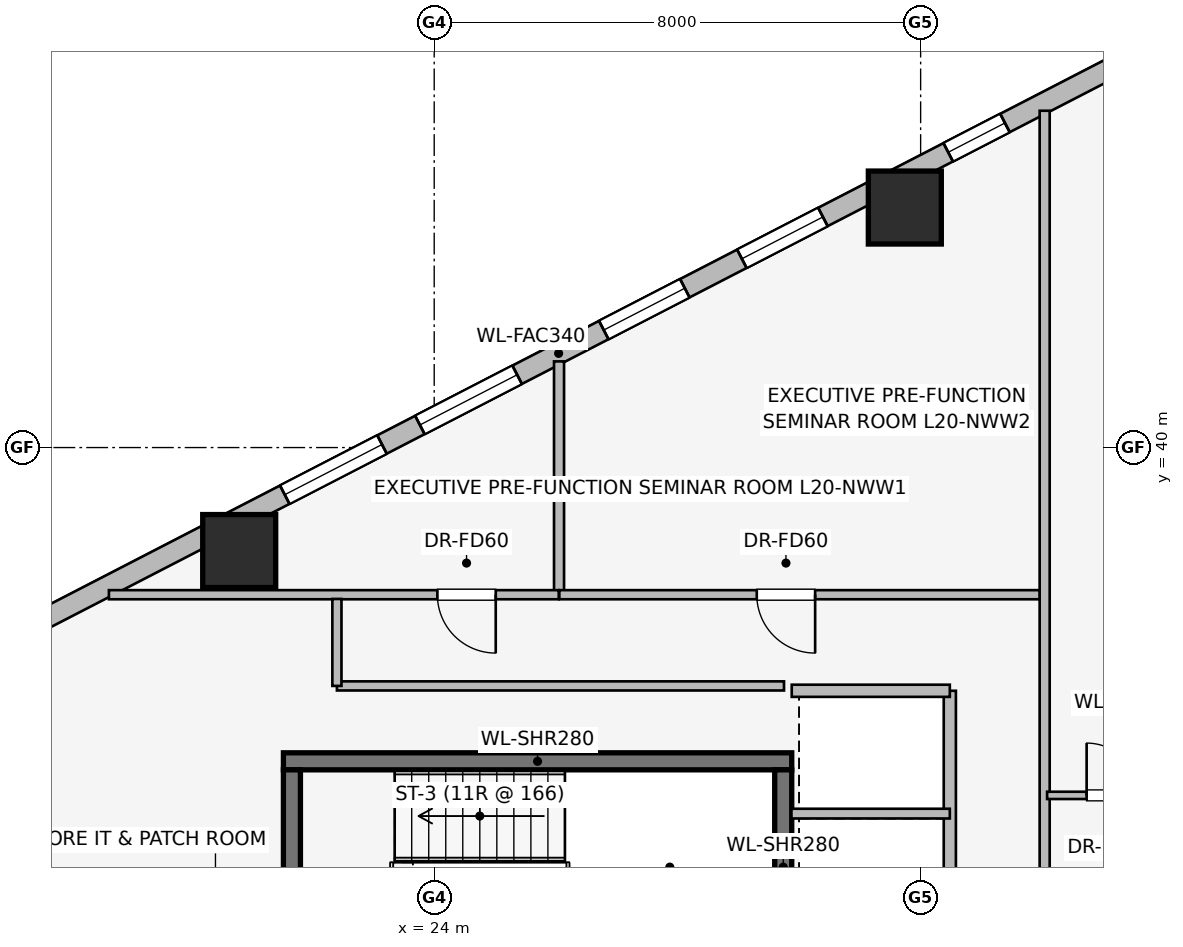
"""IFC4 building model, lengths in metres.
Left out: names, types, materials, properties, quantities, classifications, styles, units other than length and angle.
Written with IfcOpenShell. Run it as: python <this file> out.ifc"""

import sys

from ifc_helpers import new_model, si_unit, direction, frame, frame_2d, origin, origin_2d, place, context, subcontext, project, spatial, rectangle, extrude, element, fill, save


model = new_model("IFC4")
c1 = context("Model", 3, precision=1e-05, world=origin(), true_north=direction((0.0, 1.0)))
c2 = subcontext(c1, "Body", "Model", "MODEL_VIEW")
j1 = project(units=[si_unit("LENGTHUNIT", "METRE"), si_unit("PLANEANGLEUNIT", "RADIAN")], contexts=[c1])
p1 = place(None, origin())
s1 = spatial("IfcSite", under=j1, at=p1, CompositionType="ELEMENT")
p2 = place(p1, origin())
s2 = spatial("IfcBuilding", under=s1, at=p2, CompositionType="ELEMENT")
p3 = place(p2, frame((0.0, 0.0, 78.1)))
s3 = spatial("IfcBuildingStorey", under=s2, at=p3, CompositionType="ELEMENT", Elevation=78.1)
p4 = place(p3, frame((29.88, 34.84, 0.0), z_axis=(0.0, 0.0, 1.0), x_axis=(-1.0, 0.0, 0.0)))
e1 = element("IfcWall", 1, at=p4, inside=s3, PredefinedType="SHEAR", context=c2, shape_type="SweptSolid", body=[
    extrude(rectangle(XDim=8.36, YDim=0.28, at=frame_2d((4.18, 0.0))), origin(), (0.0, 0.0, 1.0), 3.65),
])
for number, where, z_axis, x_axis in (
    (2, (21.66, 34.7, 0.0), (0.0, 0.0, 1.0), (0.0, -1.0, 0.0)),
    (3, (29.74, 31.5, 0.0), (0.0, 0.0, 1.0), (0.0, 1.0, 0.0)),
):
    element("IfcWall", number, at=place(p3, frame(where, z_axis=z_axis, x_axis=x_axis)), inside=s3, PredefinedType="SHEAR", context=c2, shape_type="SweptSolid", body=[
        extrude(rectangle(XDim=3.2, YDim=0.28, at=frame_2d((1.6, 0.0))), origin(), (0.0, 0.0, 1.0), 3.65),
    ])
for number, where, z_axis, x_axis in (
    (4, (31.74, 43.947, 0.0), (0.0, 0.0, 1.0), (1.0, 0.0, 0.0)),
    (5, (20.793, 38.298, 0.0), (0.0, 0.0, 1.0), (1.0, 0.0, 0.0)),
):
    element("IfcColumn", number, at=place(p3, frame(where, z_axis=z_axis, x_axis=x_axis)), inside=s3, PredefinedType="COLUMN", context=c2, shape_type="SweptSolid", body=[
        extrude(rectangle(XDim=1.2, YDim=1.2, at=origin_2d()), origin(), (0.0, 0.0, 1.0), 3.65),
    ])
p5 = place(p3, frame((16.924, 36.841, 0.0), z_axis=(0.0, 0.0, 1.0), x_axis=(0.888634413993, 0.458616264721, 0.0)))
e6 = element("IfcWall", 6, at=p5, inside=s3, PredefinedType="STANDARD", context=c2, shape_type="SweptSolid", body=[
    extrude(rectangle(XDim=20.531, YDim=0.34, at=frame_2d((10.266, 0.0))), origin(), (0.0, 0.0, 1.0), 2.684),
])
p6 = place(p5, frame((5.197, 0.0, 0.75)))
e7 = element("IfcOpeningElement", 7, at=p6, cuts=e6, PredefinedType="OPENING", context=c2, shape_type="SweptSolid", body=[
    extrude(rectangle(XDim=1.8, YDim=1.5, at=frame_2d((0.9, 0.75))), frame((0.0, 0.18, 0.0), z_axis=(0.0, -1.0, 0.0), x_axis=(1.0, 0.0, 0.0)), (0.0, 0.0, 1.0), 0.36),
])
p7 = place(p5, frame((7.698, 0.0, 0.75)))
e8 = element("IfcOpeningElement", 8, at=p7, cuts=e6, PredefinedType="OPENING", context=c2, shape_type="SweptSolid", body=[
    extrude(rectangle(XDim=1.8, YDim=1.5, at=frame_2d((0.9, 0.75))), frame((0.0, 0.18, 0.0), z_axis=(0.0, -1.0, 0.0), x_axis=(1.0, 0.0, 0.0)), (0.0, 0.0, 1.0), 0.36),
])
p8 = place(p5, frame((11.101, 0.0, 0.75)))
e9 = element("IfcOpeningElement", 9, at=p8, cuts=e6, PredefinedType="OPENING", context=c2, shape_type="SweptSolid", body=[
    extrude(rectangle(XDim=1.5, YDim=1.5, at=frame_2d((0.75, 0.75))), frame((0.0, 0.18, 0.0), z_axis=(0.0, -1.0, 0.0), x_axis=(1.0, 0.0, 0.0)), (0.0, 0.0, 1.0), 0.36),
])
p9 = place(p5, frame((13.657, 0.0, 0.75)))
e10 = element("IfcOpeningElement", 10, at=p9, cuts=e6, PredefinedType="OPENING", context=c2, shape_type="SweptSolid", body=[
    extrude(rectangle(XDim=1.5, YDim=1.5, at=frame_2d((0.75, 0.75))), frame((0.0, 0.18, 0.0), z_axis=(0.0, -1.0, 0.0), x_axis=(1.0, 0.0, 0.0)), (0.0, 0.0, 1.0), 0.36),
])
p10 = place(p5, frame((17.476, 0.0, 0.75)))
e11 = element("IfcOpeningElement", 11, at=p10, cuts=e6, PredefinedType="OPENING", context=c2, shape_type="SweptSolid", body=[
    extrude(rectangle(XDim=1.05, YDim=1.4, at=frame_2d((0.525, 0.7))), frame((0.0, 0.18, 0.0), z_axis=(0.0, -1.0, 0.0), x_axis=(1.0, 0.0, 0.0)), (0.0, 0.0, 1.0), 0.36),
])
p11 = place(p3, frame((32.48, 31.95, 0.0), z_axis=(0.0, 0.0, 1.0), x_axis=(0.0, 1.0, 0.0)))
e12 = element("IfcWall", 12, at=p11, inside=s3, PredefinedType="PARTITIONING", context=c2, shape_type="SweptSolid", body=[
    extrude(rectangle(XDim=4.05, YDim=0.2, at=frame_2d((2.025, 0.0))), origin(), (0.0, 0.0, 1.0), 2.513),
])
p12 = place(p3, frame((29.88, 36.0, 0.0), z_axis=(0.0, 0.0, 1.0), x_axis=(1.0, 0.0, 0.0)))
e13 = element("IfcWall", 13, at=p12, inside=s3, PredefinedType="PARTITIONING", context=c2, shape_type="SweptSolid", body=[
    extrude(rectangle(XDim=2.6, YDim=0.2, at=frame_2d((1.3, 0.0))), origin(), (0.0, 0.0, 1.0), 3.39),
])
p13 = place(p3, frame((29.875, 33.98, 0.0), z_axis=(0.0, 0.0, 1.0), x_axis=(1.0, 0.0, 0.0)))
e14 = element("IfcWall", 14, at=p13, inside=s3, PredefinedType="PARTITIONING", context=c2, shape_type="SweptSolid", body=[
    extrude(rectangle(XDim=2.605, YDim=0.16, at=frame_2d((1.302, 0.0))), origin(), (0.0, 0.0, 1.0), 3.39),
])
p14 = place(p3, frame((26.053, 37.61, 0.0), z_axis=(0.0, 0.0, 1.0), x_axis=(0.0, 1.0, 0.0)))
e15 = element("IfcWall", 15, at=p14, inside=s3, PredefinedType="PARTITIONING", context=c2, shape_type="SweptSolid", body=[
    extrude(rectangle(XDim=3.807, YDim=0.165, at=frame_2d((1.903, 0.0))), origin(), (0.0, 0.0, 1.0), 3.39),
])
p15 = place(p3, frame((26.048, 37.58, 0.0), z_axis=(0.0, 0.0, 1.0), x_axis=(-1.0, 0.0, 0.0)))
e16 = element("IfcWall", 16, at=p15, inside=s3, PredefinedType="PARTITIONING", context=c2, shape_type="SweptSolid", body=[
    extrude(rectangle(XDim=7.398, YDim=0.15, at=frame_2d((3.699, 0.0))), origin(), (0.0, 0.0, 1.0), 3.39),
])
p16 = place(p15, frame((1.036, 0.0, 0.0)))
e17 = element("IfcOpeningElement", 17, at=p16, cuts=e16, PredefinedType="OPENING", context=c2, shape_type="SweptSolid", body=[
    extrude(rectangle(XDim=0.96, YDim=2.0, at=frame_2d((0.48, 1.0))), frame((0.0, 0.085, 0.0), z_axis=(0.0, -1.0, 0.0), x_axis=(1.0, 0.0, 0.0)), (0.0, 0.0, 1.0), 0.17),
])
p17 = place(p3, frame((33.962, 37.58, 0.0), z_axis=(0.0, 0.0, 1.0), x_axis=(-1.0, 0.0, 0.0)))
e18 = element("IfcWall", 18, at=p17, inside=s3, PredefinedType="PARTITIONING", context=c2, shape_type="SweptSolid", body=[
    extrude(rectangle(XDim=7.904, YDim=0.15, at=frame_2d((3.952, 0.0))), origin(), (0.0, 0.0, 1.0), 3.39),
])
p18 = place(p17, frame((3.697, 0.0, 0.0)))
e19 = element("IfcOpeningElement", 19, at=p18, cuts=e18, PredefinedType="OPENING", context=c2, shape_type="SweptSolid", body=[
    extrude(rectangle(XDim=0.96, YDim=2.0, at=frame_2d((0.48, 1.0))), frame((0.0, 0.085, 0.0), z_axis=(0.0, -1.0, 0.0), x_axis=(1.0, 0.0, 0.0)), (0.0, 0.0, 1.0), 0.17),
])
p19 = place(p3, frame((34.04, 31.96, 0.0), z_axis=(0.0, 0.0, 1.0), x_axis=(0.0, 1.0, 0.0)))
e20 = element("IfcWall", 20, at=p19, inside=s3, PredefinedType="PARTITIONING", context=c2, shape_type="SweptSolid", body=[
    extrude(rectangle(XDim=13.579, YDim=0.165, at=frame_2d((6.79, 0.0))), origin(), (0.0, 0.0, 1.0), 3.39),
])
p20 = place(p3, frame((34.08, 34.28, 0.0), z_axis=(0.0, 0.0, 1.0), x_axis=(1.0, 0.0, 0.0)))
e21 = element("IfcWall", 21, at=p20, inside=s3, PredefinedType="PARTITIONING", context=c2, shape_type="SweptSolid", body=[
    extrude(rectangle(XDim=2.48, YDim=0.12, at=frame_2d((1.24, 0.0))), origin(), (0.0, 0.0, 1.0), 3.39),
])
p21 = place(p20, frame((0.65, 0.0, 0.0)))
e22 = element("IfcOpeningElement", 22, at=p21, cuts=e21, PredefinedType="OPENING", context=c2, shape_type="SweptSolid", body=[
    extrude(rectangle(XDim=0.86, YDim=2.0, at=frame_2d((0.43, 1.0))), frame((0.0, 0.07, 0.0), z_axis=(0.0, -1.0, 0.0), x_axis=(1.0, 0.0, 0.0)), (0.0, 0.0, 1.0), 0.14),
])
p22 = place(p3, frame((29.753, 36.08, 0.0), z_axis=(0.0, 0.0, 1.0), x_axis=(-1.0, 0.0, 0.0)))
e23 = element("IfcWall", 23, at=p22, inside=s3, PredefinedType="PARTITIONING", context=c2, shape_type="SweptSolid", body=[
    extrude(rectangle(XDim=7.353, YDim=0.15, at=frame_2d((3.677, 0.0))), origin(), (0.0, 0.0, 1.0), 3.39),
])
p23 = place(p3, frame((22.4, 36.08, 0.0), z_axis=(0.0, 0.0, 1.0), x_axis=(0.0, 1.0, 0.0)))
e24 = element("IfcWall", 24, at=p23, inside=s3, PredefinedType="PARTITIONING", context=c2, shape_type="SweptSolid", body=[
    extrude(rectangle(XDim=1.43, YDim=0.15, at=frame_2d((0.715, 0.0))), origin(), (0.0, 0.0, 1.0), 3.39),
])
p24 = place(p6, origin())
e25 = element("IfcWindow", 25, at=p24, inside=s3, PartitioningType="SINGLE_PANEL", PredefinedType="WINDOW", context=c2, shape_type="SweptSolid", body=[
    extrude(rectangle(XDim=1.8, YDim=1.5, at=frame_2d((0.9, 0.75))), frame((0.0, 0.03, 0.0), z_axis=(0.0, -1.0, 0.0), x_axis=(1.0, 0.0, 0.0)), (0.0, 0.0, 1.0), 0.06),
])
fill(e7, e25)
p25 = place(p7, origin())
e26 = element("IfcWindow", 26, at=p25, inside=s3, PartitioningType="SINGLE_PANEL", PredefinedType="WINDOW", context=c2, shape_type="SweptSolid", body=[
    extrude(rectangle(XDim=1.8, YDim=1.5, at=frame_2d((0.9, 0.75))), frame((0.0, 0.03, 0.0), z_axis=(0.0, -1.0, 0.0), x_axis=(1.0, 0.0, 0.0)), (0.0, 0.0, 1.0), 0.06),
])
fill(e8, e26)
p26 = place(p8, origin())
e27 = element("IfcWindow", 27, at=p26, inside=s3, PartitioningType="SINGLE_PANEL", PredefinedType="WINDOW", context=c2, shape_type="SweptSolid", body=[
    extrude(rectangle(XDim=1.5, YDim=1.5, at=frame_2d((0.75, 0.75))), frame((0.0, 0.03, 0.0), z_axis=(0.0, -1.0, 0.0), x_axis=(1.0, 0.0, 0.0)), (0.0, 0.0, 1.0), 0.06),
])
fill(e9, e27)
p27 = place(p9, origin())
e28 = element("IfcWindow", 28, at=p27, inside=s3, PartitioningType="SINGLE_PANEL", PredefinedType="WINDOW", context=c2, shape_type="SweptSolid", body=[
    extrude(rectangle(XDim=1.5, YDim=1.5, at=frame_2d((0.75, 0.75))), frame((0.0, 0.03, 0.0), z_axis=(0.0, -1.0, 0.0), x_axis=(1.0, 0.0, 0.0)), (0.0, 0.0, 1.0), 0.06),
])
fill(e10, e28)
p28 = place(p10, origin())
e29 = element("IfcWindow", 29, at=p28, inside=s3, PartitioningType="SINGLE_PANEL", PredefinedType="WINDOW", context=c2, shape_type="SweptSolid", body=[
    extrude(rectangle(XDim=1.05, YDim=1.4, at=frame_2d((0.525, 0.7))), frame((0.0, 0.03, 0.0), z_axis=(0.0, -1.0, 0.0), x_axis=(1.0, 0.0, 0.0)), (0.0, 0.0, 1.0), 0.06),
])
fill(e11, e29)
p29 = place(p16, origin())
e30 = element("IfcDoor", 30, at=p29, inside=s3, OperationType="SINGLE_SWING_LEFT", PredefinedType="DOOR", context=c2, shape_type="SweptSolid", body=[
    extrude(rectangle(XDim=0.96, YDim=2.0, at=frame_2d((0.48, 1.0))), frame((0.0, 0.025, 0.0), z_axis=(0.0, -1.0, 0.0), x_axis=(1.0, 0.0, 0.0)), (0.0, 0.0, 1.0), 0.05),
])
fill(e17, e30)
p30 = place(p18, origin())
e31 = element("IfcDoor", 31, at=p30, inside=s3, OperationType="SINGLE_SWING_LEFT", PredefinedType="DOOR", context=c2, shape_type="SweptSolid", body=[
    extrude(rectangle(XDim=0.96, YDim=2.0, at=frame_2d((0.48, 1.0))), frame((0.0, 0.025, 0.0), z_axis=(0.0, -1.0, 0.0), x_axis=(1.0, 0.0, 0.0)), (0.0, 0.0, 1.0), 0.05),
])
fill(e19, e31)
p31 = place(p21, origin())
e32 = element("IfcDoor", 32, at=p31, inside=s3, OperationType="SINGLE_SWING_LEFT", PredefinedType="DOOR", context=c2, shape_type="SweptSolid", body=[
    extrude(rectangle(XDim=0.86, YDim=2.0, at=frame_2d((0.43, 1.0))), frame((0.0, 0.025, 0.0), z_axis=(0.0, -1.0, 0.0), x_axis=(1.0, 0.0, 0.0)), (0.0, 0.0, 1.0), 0.05),
])
fill(e22, e32)
save(model, sys.argv[1])
